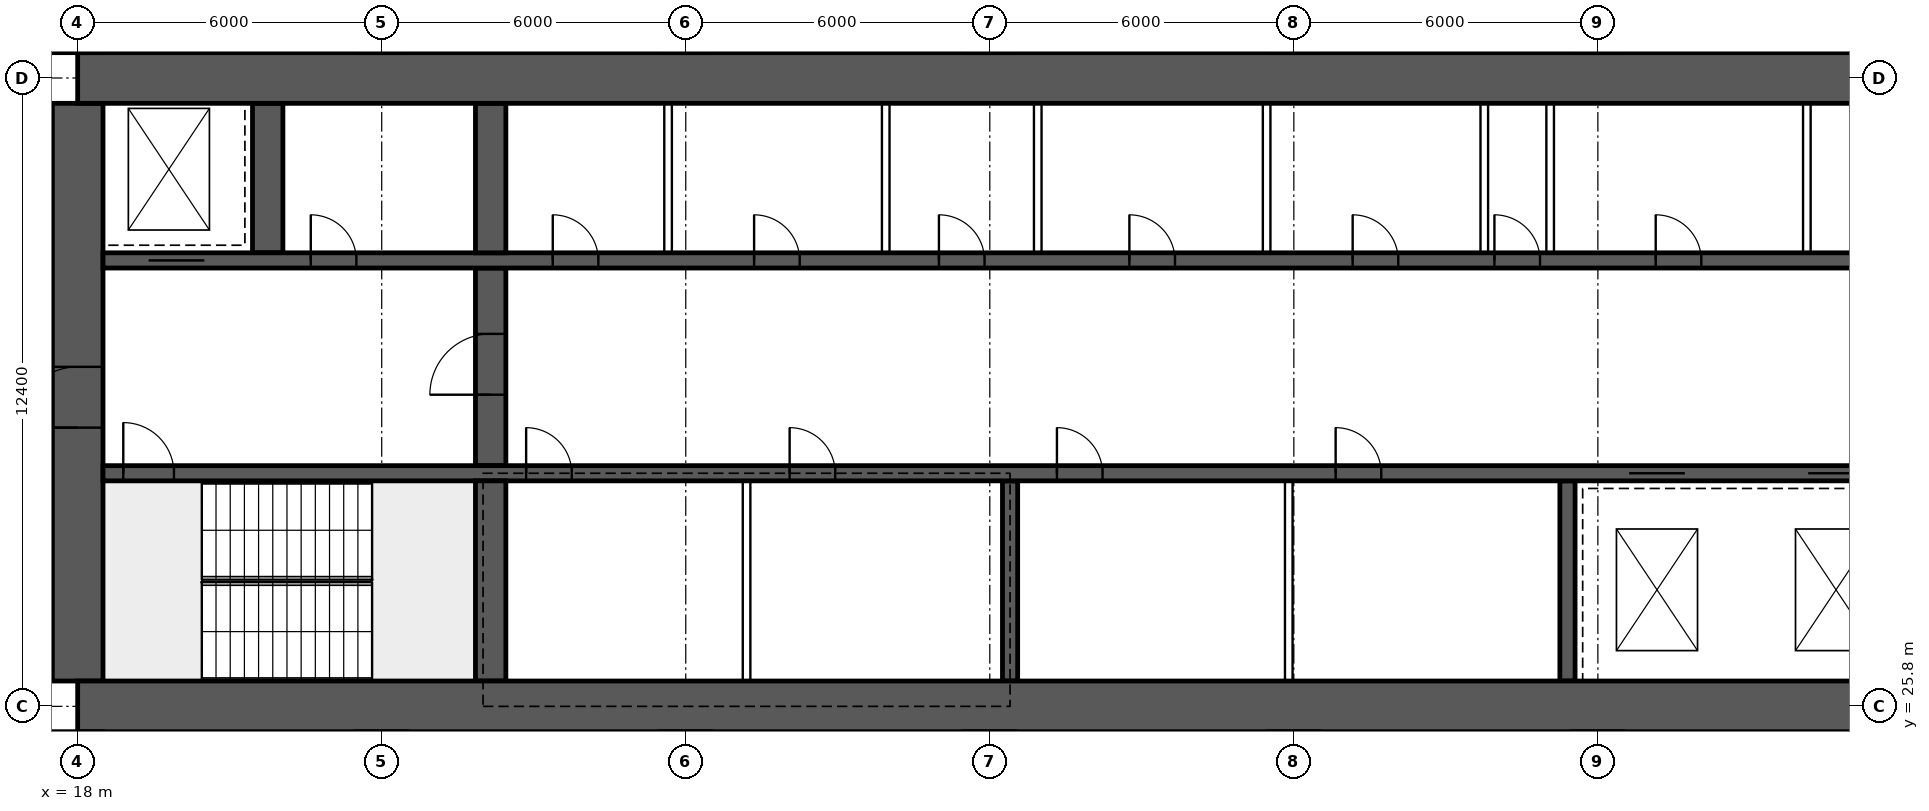
"""IFC4 building model, lengths in metres.
Left out: names, types, materials, properties, quantities, classifications, styles, units other than length and angle.
Written with IfcOpenShell. Run it as: python <this file> out.ifc"""

import sys

from ifc_helpers import new_model, si_unit, direction, frame, frame_2d, origin, place, context, subcontext, project, spatial, rectangle, extrude, element, fill, save


model = new_model("IFC4")
c1 = context("Model", 3, precision=1e-05, world=origin(), true_north=direction((0.0, 1.0)))
c2 = subcontext(c1, "Body", "Model", "MODEL_VIEW")
j1 = project(units=[si_unit("LENGTHUNIT", "METRE"), si_unit("PLANEANGLEUNIT", "RADIAN")], contexts=[c1])
p1 = place(None, origin())
s1 = spatial("IfcSite", under=j1, at=p1, CompositionType="ELEMENT")
p2 = place(p1, origin())
s2 = spatial("IfcBuilding", under=s1, at=p2, CompositionType="ELEMENT")
p3 = place(p2, frame((0.0, 0.0, -9.0)))
s3 = spatial("IfcBuildingStorey", under=s2, at=p3, CompositionType="ELEMENT", Elevation=-9.0)
for number, where, z_axis, x_axis in (
    (1, (18.0, 25.8, 0.0), (0.0, 0.0, 1.0), (1.0, 0.0, 0.0)),
    (2, (18.0, 38.2, 0.0), (0.0, 0.0, 1.0), (1.0, 0.0, 0.0)),
):
    element("IfcWall", number, at=place(p3, frame(where, z_axis=z_axis, x_axis=x_axis)), inside=s3, PredefinedType="SHEAR", context=c2, shape_type="SweptSolid", body=[
        extrude(rectangle(XDim=48.0, YDim=1.0, at=frame_2d((24.0, 0.0))), origin(), (0.0, 0.0, 1.0), 4.5),
    ])
p4 = place(p3, frame((18.0, 26.3, 0.0), z_axis=(0.0, 0.0, 1.0), x_axis=(0.0, 1.0, 0.0)))
e3 = element("IfcWall", 3, at=p4, inside=s3, PredefinedType="SHEAR", context=c2, shape_type="SweptSolid", body=[
    extrude(rectangle(XDim=11.4, YDim=1.0, at=frame_2d((5.7, 0.0))), origin(), (0.0, 0.0, 1.0), 4.5),
])
p5 = place(p4, frame((5.0, 0.0, 0.0)))
e4 = element("IfcOpeningElement", 4, at=p5, cuts=e3, PredefinedType="OPENING", context=c2, shape_type="SweptSolid", body=[
    extrude(rectangle(XDim=1.2, YDim=2.1, at=frame_2d((0.6, 1.05))), frame((0.0, 0.51, 0.0), z_axis=(0.0, -1.0, 0.0), x_axis=(1.0, 0.0, 0.0)), (0.0, 0.0, 1.0), 1.02),
])
p6 = place(p3, frame((18.5, 30.4, 0.0), z_axis=(0.0, 0.0, 1.0), x_axis=(1.0, 0.0, 0.0)))
e5 = element("IfcWall", 5, at=p6, inside=s3, PredefinedType="SHEAR", context=c2, shape_type="SweptSolid", body=[
    extrude(rectangle(XDim=47.0, YDim=0.3, at=frame_2d((23.5, 0.0))), origin(), (0.0, 0.0, 1.0), 4.5),
])
p7 = place(p6, frame((0.4, 0.0, 0.0)))
e6 = element("IfcOpeningElement", 6, at=p7, cuts=e5, PredefinedType="OPENING", context=c2, shape_type="SweptSolid", body=[
    extrude(rectangle(XDim=1.0, YDim=2.1, at=frame_2d((0.5, 1.05))), frame((0.0, 0.16, 0.0), z_axis=(0.0, -1.0, 0.0), x_axis=(1.0, 0.0, 0.0)), (0.0, 0.0, 1.0), 0.32),
])
p8 = place(p6, frame((45.6, 0.0, 0.0)))
e7 = element("IfcOpeningElement", 7, at=p8, cuts=e5, PredefinedType="OPENING", context=c2, shape_type="SweptSolid", body=[
    extrude(rectangle(XDim=1.0, YDim=2.1, at=frame_2d((0.5, 1.05))), frame((0.0, 0.16, 0.0), z_axis=(0.0, -1.0, 0.0), x_axis=(1.0, 0.0, 0.0)), (0.0, 0.0, 1.0), 0.32),
])
p9 = place(p6, frame((8.35, 0.0, 0.0)))
e8 = element("IfcOpeningElement", 8, at=p9, cuts=e5, PredefinedType="OPENING", context=c2, shape_type="SweptSolid", body=[
    extrude(rectangle(XDim=0.9, YDim=2.1, at=frame_2d((0.45, 1.05))), frame((0.0, 0.16, 0.0), z_axis=(0.0, -1.0, 0.0), x_axis=(1.0, 0.0, 0.0)), (0.0, 0.0, 1.0), 0.32),
])
p10 = place(p6, frame((13.55, 0.0, 0.0)))
e9 = element("IfcOpeningElement", 9, at=p10, cuts=e5, PredefinedType="OPENING", context=c2, shape_type="SweptSolid", body=[
    extrude(rectangle(XDim=0.9, YDim=2.1, at=frame_2d((0.45, 1.05))), frame((0.0, 0.16, 0.0), z_axis=(0.0, -1.0, 0.0), x_axis=(1.0, 0.0, 0.0)), (0.0, 0.0, 1.0), 0.32),
])
p11 = place(p6, frame((18.825, 0.0, 0.0)))
e10 = element("IfcOpeningElement", 10, at=p11, cuts=e5, PredefinedType="OPENING", context=c2, shape_type="SweptSolid", body=[
    extrude(rectangle(XDim=0.9, YDim=2.1, at=frame_2d((0.45, 1.05))), frame((0.0, 0.16, 0.0), z_axis=(0.0, -1.0, 0.0), x_axis=(1.0, 0.0, 0.0)), (0.0, 0.0, 1.0), 0.32),
])
p12 = place(p6, frame((24.325, 0.0, 0.0)))
e11 = element("IfcOpeningElement", 11, at=p12, cuts=e5, PredefinedType="OPENING", context=c2, shape_type="SweptSolid", body=[
    extrude(rectangle(XDim=0.9, YDim=2.1, at=frame_2d((0.45, 1.05))), frame((0.0, 0.16, 0.0), z_axis=(0.0, -1.0, 0.0), x_axis=(1.0, 0.0, 0.0)), (0.0, 0.0, 1.0), 0.32),
])
p13 = place(p6, frame((30.117, 0.0, 0.0)))
e12 = element("IfcOpeningElement", 12, at=p13, cuts=e5, PredefinedType="OPENING", context=c2, shape_type="SweptSolid", body=[
    extrude(rectangle(XDim=1.1, YDim=2.1, at=frame_2d((0.55, 1.05))), frame((0.0, 0.16, 0.0), z_axis=(0.0, -1.0, 0.0), x_axis=(1.0, 0.0, 0.0)), (0.0, 0.0, 1.0), 0.32),
])
p14 = place(p6, frame((33.65, 0.0, 0.0)))
e13 = element("IfcOpeningElement", 13, at=p14, cuts=e5, PredefinedType="OPENING", context=c2, shape_type="SweptSolid", body=[
    extrude(rectangle(XDim=1.1, YDim=2.1, at=frame_2d((0.55, 1.05))), frame((0.0, 0.16, 0.0), z_axis=(0.0, -1.0, 0.0), x_axis=(1.0, 0.0, 0.0)), (0.0, 0.0, 1.0), 0.32),
])
p15 = place(p6, frame((37.183, 0.0, 0.0)))
e14 = element("IfcOpeningElement", 14, at=p15, cuts=e5, PredefinedType="OPENING", context=c2, shape_type="SweptSolid", body=[
    extrude(rectangle(XDim=1.1, YDim=2.1, at=frame_2d((0.55, 1.05))), frame((0.0, 0.16, 0.0), z_axis=(0.0, -1.0, 0.0), x_axis=(1.0, 0.0, 0.0)), (0.0, 0.0, 1.0), 0.32),
])
p16 = place(p3, frame((18.5, 34.6, 0.0), z_axis=(0.0, 0.0, 1.0), x_axis=(1.0, 0.0, 0.0)))
e15 = element("IfcWall", 15, at=p16, inside=s3, PredefinedType="SHEAR", context=c2, shape_type="SweptSolid", body=[
    extrude(rectangle(XDim=47.0, YDim=0.3, at=frame_2d((23.5, 0.0))), origin(), (0.0, 0.0, 1.0), 4.5),
])
p17 = place(p16, frame((0.9, 0.0, 0.0)))
e16 = element("IfcOpeningElement", 16, at=p17, cuts=e15, PredefinedType="OPENING", context=c2, shape_type="SweptSolid", body=[
    extrude(rectangle(XDim=1.1, YDim=2.1, at=frame_2d((0.55, 1.05))), frame((0.0, 0.16, 0.0), z_axis=(0.0, -1.0, 0.0), x_axis=(1.0, 0.0, 0.0)), (0.0, 0.0, 1.0), 0.32),
])
p18 = place(p16, frame((45.0, 0.0, 0.0)))
e17 = element("IfcOpeningElement", 17, at=p18, cuts=e15, PredefinedType="OPENING", context=c2, shape_type="SweptSolid", body=[
    extrude(rectangle(XDim=1.1, YDim=2.1, at=frame_2d((0.55, 1.05))), frame((0.0, 0.16, 0.0), z_axis=(0.0, -1.0, 0.0), x_axis=(1.0, 0.0, 0.0)), (0.0, 0.0, 1.0), 0.32),
])
p19 = place(p16, frame((4.1, 0.0, 0.0)))
e18 = element("IfcOpeningElement", 18, at=p19, cuts=e15, PredefinedType="OPENING", context=c2, shape_type="SweptSolid", body=[
    extrude(rectangle(XDim=0.9, YDim=2.1, at=frame_2d((0.45, 1.05))), frame((0.0, 0.16, 0.0), z_axis=(0.0, -1.0, 0.0), x_axis=(1.0, 0.0, 0.0)), (0.0, 0.0, 1.0), 0.32),
])
p20 = place(p16, frame((42.0, 0.0, 0.0)))
e19 = element("IfcOpeningElement", 19, at=p20, cuts=e15, PredefinedType="OPENING", context=c2, shape_type="SweptSolid", body=[
    extrude(rectangle(XDim=0.9, YDim=2.1, at=frame_2d((0.45, 1.05))), frame((0.0, 0.16, 0.0), z_axis=(0.0, -1.0, 0.0), x_axis=(1.0, 0.0, 0.0)), (0.0, 0.0, 1.0), 0.32),
])
p21 = place(p16, frame((8.875, 0.0, 0.0)))
e20 = element("IfcOpeningElement", 20, at=p21, cuts=e15, PredefinedType="OPENING", context=c2, shape_type="SweptSolid", body=[
    extrude(rectangle(XDim=0.9, YDim=2.1, at=frame_2d((0.45, 1.05))), frame((0.0, 0.16, 0.0), z_axis=(0.0, -1.0, 0.0), x_axis=(1.0, 0.0, 0.0)), (0.0, 0.0, 1.0), 0.32),
])
p22 = place(p16, frame((12.849, 0.0, 0.0)))
e21 = element("IfcOpeningElement", 21, at=p22, cuts=e15, PredefinedType="OPENING", context=c2, shape_type="SweptSolid", body=[
    extrude(rectangle(XDim=0.9, YDim=2.1, at=frame_2d((0.45, 1.05))), frame((0.0, 0.16, 0.0), z_axis=(0.0, -1.0, 0.0), x_axis=(1.0, 0.0, 0.0)), (0.0, 0.0, 1.0), 0.32),
])
p23 = place(p16, frame((16.496, 0.0, 0.0)))
e22 = element("IfcOpeningElement", 22, at=p23, cuts=e15, PredefinedType="OPENING", context=c2, shape_type="SweptSolid", body=[
    extrude(rectangle(XDim=0.9, YDim=2.1, at=frame_2d((0.45, 1.05))), frame((0.0, 0.16, 0.0), z_axis=(0.0, -1.0, 0.0), x_axis=(1.0, 0.0, 0.0)), (0.0, 0.0, 1.0), 0.32),
])
p24 = place(p16, frame((20.255, 0.0, 0.0)))
e23 = element("IfcOpeningElement", 23, at=p24, cuts=e15, PredefinedType="OPENING", context=c2, shape_type="SweptSolid", body=[
    extrude(rectangle(XDim=0.9, YDim=2.1, at=frame_2d((0.45, 1.05))), frame((0.0, 0.16, 0.0), z_axis=(0.0, -1.0, 0.0), x_axis=(1.0, 0.0, 0.0)), (0.0, 0.0, 1.0), 0.32),
])
p25 = place(p16, frame((24.661, 0.0, 0.0)))
e24 = element("IfcOpeningElement", 24, at=p25, cuts=e15, PredefinedType="OPENING", context=c2, shape_type="SweptSolid", body=[
    extrude(rectangle(XDim=0.9, YDim=2.1, at=frame_2d((0.45, 1.05))), frame((0.0, 0.16, 0.0), z_axis=(0.0, -1.0, 0.0), x_axis=(1.0, 0.0, 0.0)), (0.0, 0.0, 1.0), 0.32),
])
p26 = place(p16, frame((27.458, 0.0, 0.0)))
e25 = element("IfcOpeningElement", 25, at=p26, cuts=e15, PredefinedType="OPENING", context=c2, shape_type="SweptSolid", body=[
    extrude(rectangle(XDim=0.9, YDim=2.1, at=frame_2d((0.45, 1.05))), frame((0.0, 0.16, 0.0), z_axis=(0.0, -1.0, 0.0), x_axis=(1.0, 0.0, 0.0)), (0.0, 0.0, 1.0), 0.32),
])
p27 = place(p16, frame((30.641, 0.0, 0.0)))
e26 = element("IfcOpeningElement", 26, at=p27, cuts=e15, PredefinedType="OPENING", context=c2, shape_type="SweptSolid", body=[
    extrude(rectangle(XDim=0.9, YDim=2.1, at=frame_2d((0.45, 1.05))), frame((0.0, 0.16, 0.0), z_axis=(0.0, -1.0, 0.0), x_axis=(1.0, 0.0, 0.0)), (0.0, 0.0, 1.0), 0.32),
])
p28 = place(p16, frame((34.592, 0.0, 0.0)))
e27 = element("IfcOpeningElement", 27, at=p28, cuts=e15, PredefinedType="OPENING", context=c2, shape_type="SweptSolid", body=[
    extrude(rectangle(XDim=0.9, YDim=2.1, at=frame_2d((0.45, 1.05))), frame((0.0, 0.16, 0.0), z_axis=(0.0, -1.0, 0.0), x_axis=(1.0, 0.0, 0.0)), (0.0, 0.0, 1.0), 0.32),
])
p29 = place(p16, frame((37.53, 0.0, 0.0)))
e28 = element("IfcOpeningElement", 28, at=p29, cuts=e15, PredefinedType="OPENING", context=c2, shape_type="SweptSolid", body=[
    extrude(rectangle(XDim=0.9, YDim=2.1, at=frame_2d((0.45, 1.05))), frame((0.0, 0.16, 0.0), z_axis=(0.0, -1.0, 0.0), x_axis=(1.0, 0.0, 0.0)), (0.0, 0.0, 1.0), 0.32),
])
p30 = place(p3, frame((26.15, 26.3, 0.0), z_axis=(0.0, 0.0, 1.0), x_axis=(0.0, 1.0, 0.0)))
e29 = element("IfcWall", 29, at=p30, inside=s3, PredefinedType="SHEAR", context=c2, shape_type="SweptSolid", body=[
    extrude(rectangle(XDim=3.95, YDim=0.6, at=frame_2d((1.975, 0.0))), origin(), (0.0, 0.0, 1.0), 4.5),
])
p31 = place(p3, frame((26.15, 30.55, 0.0), z_axis=(0.0, 0.0, 1.0), x_axis=(0.0, 1.0, 0.0)))
e30 = element("IfcWall", 30, at=p31, inside=s3, PredefinedType="SHEAR", context=c2, shape_type="SweptSolid", body=[
    extrude(rectangle(XDim=3.9, YDim=0.6, at=frame_2d((1.95, 0.0))), origin(), (0.0, 0.0, 1.0), 4.5),
])
p32 = place(p31, frame((1.4, 0.0, 0.0)))
e31 = element("IfcOpeningElement", 31, at=p32, cuts=e30, PredefinedType="OPENING", context=c2, shape_type="SweptSolid", body=[
    extrude(rectangle(XDim=1.2, YDim=2.1, at=frame_2d((0.6, 1.05))), frame((0.0, 0.31, 0.0), z_axis=(0.0, -1.0, 0.0), x_axis=(1.0, 0.0, 0.0)), (0.0, 0.0, 1.0), 0.62),
])
for number, where, z_axis, x_axis in (
    (32, (21.75, 34.75, 0.0), (0.0, 0.0, 1.0), (0.0, 1.0, 0.0)),
    (33, (26.15, 34.75, 0.0), (0.0, 0.0, 1.0), (0.0, 1.0, 0.0)),
):
    element("IfcWall", number, at=place(p3, frame(where, z_axis=z_axis, x_axis=x_axis)), inside=s3, PredefinedType="SHEAR", context=c2, shape_type="SweptSolid", body=[
        extrude(rectangle(XDim=2.95, YDim=0.6, at=frame_2d((1.475, 0.0))), origin(), (0.0, 0.0, 1.0), 4.5),
    ])
for number, where, z_axis, x_axis in (
    (34, (36.4, 26.3, 0.0), (0.0, 0.0, 1.0), (0.0, 1.0, 0.0)),
    (35, (47.4, 26.3, 0.0), (0.0, 0.0, 1.0), (0.0, 1.0, 0.0)),
):
    element("IfcWall", number, at=place(p3, frame(where, z_axis=z_axis, x_axis=x_axis)), inside=s3, PredefinedType="SHEAR", context=c2, shape_type="SweptSolid", body=[
        extrude(rectangle(XDim=3.95, YDim=0.3, at=frame_2d((1.975, 0.0))), origin(), (0.0, 0.0, 1.0), 4.5),
    ])
for number, where, z_axis, x_axis in (
    (36, (29.651, 34.75, 0.0), (0.0, 0.0, 1.0), (0.0, 1.0, 0.0)),
    (37, (33.946, 34.75, 0.0), (0.0, 0.0, 1.0), (0.0, 1.0, 0.0)),
    (38, (36.946, 34.75, 0.0), (0.0, 0.0, 1.0), (0.0, 1.0, 0.0)),
    (39, (41.463, 34.75, 0.0), (0.0, 0.0, 1.0), (0.0, 1.0, 0.0)),
    (40, (45.758, 34.75, 0.0), (0.0, 0.0, 1.0), (0.0, 1.0, 0.0)),
    (41, (47.058, 34.75, 0.0), (0.0, 0.0, 1.0), (0.0, 1.0, 0.0)),
    (42, (52.124, 34.75, 0.0), (0.0, 0.0, 1.0), (0.0, 1.0, 0.0)),
):
    element("IfcWall", number, at=place(p3, frame(where, z_axis=z_axis, x_axis=x_axis)), inside=s3, PredefinedType="SOLIDWALL", context=c2, shape_type="SweptSolid", body=[
        extrude(rectangle(XDim=2.95, YDim=0.15, at=frame_2d((1.475, 0.0))), origin(), (0.0, 0.0, 1.0), 4.2),
    ])
for number, where, z_axis, x_axis in (
    (43, (31.2, 26.3, 0.0), (0.0, 0.0, 1.0), (0.0, 1.0, 0.0)),
    (44, (41.9, 26.3, 0.0), (0.0, 0.0, 1.0), (0.0, 1.0, 0.0)),
):
    element("IfcWall", number, at=place(p3, frame(where, z_axis=z_axis, x_axis=x_axis)), inside=s3, PredefinedType="SOLIDWALL", context=c2, shape_type="SweptSolid", body=[
        extrude(rectangle(XDim=3.95, YDim=0.15, at=frame_2d((1.975, 0.0))), origin(), (0.0, 0.0, 1.0), 4.2),
    ])
p33 = place(p5, origin())
e45 = element("IfcDoor", 45, at=p33, inside=s3, OperationType="SINGLE_SWING_LEFT", PredefinedType="DOOR", context=c2, shape_type="SweptSolid", body=[
    extrude(rectangle(XDim=1.2, YDim=2.1, at=frame_2d((0.6, 1.05))), frame((0.0, 0.025, 0.0), z_axis=(0.0, -1.0, 0.0), x_axis=(1.0, 0.0, 0.0)), (0.0, 0.0, 1.0), 0.05),
])
fill(e4, e45)
p34 = place(p7, origin())
e46 = element("IfcDoor", 46, at=p34, inside=s3, OperationType="SINGLE_SWING_LEFT", PredefinedType="DOOR", context=c2, shape_type="SweptSolid", body=[
    extrude(rectangle(XDim=1.0, YDim=2.1, at=frame_2d((0.5, 1.05))), frame((0.0, 0.025, 0.0), z_axis=(0.0, -1.0, 0.0), x_axis=(1.0, 0.0, 0.0)), (0.0, 0.0, 1.0), 0.05),
])
fill(e6, e46)
p35 = place(p17, origin())
e47 = element("IfcDoor", 47, at=p35, inside=s3, OperationType="DOUBLE_DOOR_SLIDING", PredefinedType="DOOR", context=c2, shape_type="SweptSolid", body=[
    extrude(rectangle(XDim=1.1, YDim=2.1, at=frame_2d((0.55, 1.05))), frame((0.0, 0.025, 0.0), z_axis=(0.0, -1.0, 0.0), x_axis=(1.0, 0.0, 0.0)), (0.0, 0.0, 1.0), 0.05),
])
fill(e16, e47)
p36 = place(p19, origin())
e48 = element("IfcDoor", 48, at=p36, inside=s3, OperationType="SINGLE_SWING_LEFT", PredefinedType="DOOR", context=c2, shape_type="SweptSolid", body=[
    extrude(rectangle(XDim=0.9, YDim=2.1, at=frame_2d((0.45, 1.05))), frame((0.0, 0.025, 0.0), z_axis=(0.0, -1.0, 0.0), x_axis=(1.0, 0.0, 0.0)), (0.0, 0.0, 1.0), 0.05),
])
fill(e18, e48)
p37 = place(p32, origin())
e49 = element("IfcDoor", 49, at=p37, inside=s3, OperationType="SINGLE_SWING_LEFT", PredefinedType="DOOR", context=c2, shape_type="SweptSolid", body=[
    extrude(rectangle(XDim=1.2, YDim=2.1, at=frame_2d((0.6, 1.05))), frame((0.0, 0.025, 0.0), z_axis=(0.0, -1.0, 0.0), x_axis=(1.0, 0.0, 0.0)), (0.0, 0.0, 1.0), 0.05),
])
fill(e31, e49)
p38 = place(p21, origin())
e50 = element("IfcDoor", 50, at=p38, inside=s3, OperationType="SINGLE_SWING_LEFT", PredefinedType="DOOR", context=c2, shape_type="SweptSolid", body=[
    extrude(rectangle(XDim=0.9, YDim=2.1, at=frame_2d((0.45, 1.05))), frame((0.0, 0.025, 0.0), z_axis=(0.0, -1.0, 0.0), x_axis=(1.0, 0.0, 0.0)), (0.0, 0.0, 1.0), 0.05),
])
fill(e20, e50)
p39 = place(p22, origin())
e51 = element("IfcDoor", 51, at=p39, inside=s3, OperationType="SINGLE_SWING_LEFT", PredefinedType="DOOR", context=c2, shape_type="SweptSolid", body=[
    extrude(rectangle(XDim=0.9, YDim=2.1, at=frame_2d((0.45, 1.05))), frame((0.0, 0.025, 0.0), z_axis=(0.0, -1.0, 0.0), x_axis=(1.0, 0.0, 0.0)), (0.0, 0.0, 1.0), 0.05),
])
fill(e21, e51)
p40 = place(p23, origin())
e52 = element("IfcDoor", 52, at=p40, inside=s3, OperationType="SINGLE_SWING_LEFT", PredefinedType="DOOR", context=c2, shape_type="SweptSolid", body=[
    extrude(rectangle(XDim=0.9, YDim=2.1, at=frame_2d((0.45, 1.05))), frame((0.0, 0.025, 0.0), z_axis=(0.0, -1.0, 0.0), x_axis=(1.0, 0.0, 0.0)), (0.0, 0.0, 1.0), 0.05),
])
fill(e22, e52)
p41 = place(p24, origin())
e53 = element("IfcDoor", 53, at=p41, inside=s3, OperationType="SINGLE_SWING_LEFT", PredefinedType="DOOR", context=c2, shape_type="SweptSolid", body=[
    extrude(rectangle(XDim=0.9, YDim=2.1, at=frame_2d((0.45, 1.05))), frame((0.0, 0.025, 0.0), z_axis=(0.0, -1.0, 0.0), x_axis=(1.0, 0.0, 0.0)), (0.0, 0.0, 1.0), 0.05),
])
fill(e23, e53)
p42 = place(p25, origin())
e54 = element("IfcDoor", 54, at=p42, inside=s3, OperationType="SINGLE_SWING_LEFT", PredefinedType="DOOR", context=c2, shape_type="SweptSolid", body=[
    extrude(rectangle(XDim=0.9, YDim=2.1, at=frame_2d((0.45, 1.05))), frame((0.0, 0.025, 0.0), z_axis=(0.0, -1.0, 0.0), x_axis=(1.0, 0.0, 0.0)), (0.0, 0.0, 1.0), 0.05),
])
fill(e24, e54)
p43 = place(p26, origin())
e55 = element("IfcDoor", 55, at=p43, inside=s3, OperationType="SINGLE_SWING_LEFT", PredefinedType="DOOR", context=c2, shape_type="SweptSolid", body=[
    extrude(rectangle(XDim=0.9, YDim=2.1, at=frame_2d((0.45, 1.05))), frame((0.0, 0.025, 0.0), z_axis=(0.0, -1.0, 0.0), x_axis=(1.0, 0.0, 0.0)), (0.0, 0.0, 1.0), 0.05),
])
fill(e25, e55)
p44 = place(p27, origin())
e56 = element("IfcDoor", 56, at=p44, inside=s3, OperationType="SINGLE_SWING_LEFT", PredefinedType="DOOR", context=c2, shape_type="SweptSolid", body=[
    extrude(rectangle(XDim=0.9, YDim=2.1, at=frame_2d((0.45, 1.05))), frame((0.0, 0.025, 0.0), z_axis=(0.0, -1.0, 0.0), x_axis=(1.0, 0.0, 0.0)), (0.0, 0.0, 1.0), 0.05),
])
fill(e26, e56)
p45 = place(p9, origin())
e57 = element("IfcDoor", 57, at=p45, inside=s3, OperationType="SINGLE_SWING_LEFT", PredefinedType="DOOR", context=c2, shape_type="SweptSolid", body=[
    extrude(rectangle(XDim=0.9, YDim=2.1, at=frame_2d((0.45, 1.05))), frame((0.0, 0.025, 0.0), z_axis=(0.0, -1.0, 0.0), x_axis=(1.0, 0.0, 0.0)), (0.0, 0.0, 1.0), 0.05),
])
fill(e8, e57)
p46 = place(p10, origin())
e58 = element("IfcDoor", 58, at=p46, inside=s3, OperationType="SINGLE_SWING_LEFT", PredefinedType="DOOR", context=c2, shape_type="SweptSolid", body=[
    extrude(rectangle(XDim=0.9, YDim=2.1, at=frame_2d((0.45, 1.05))), frame((0.0, 0.025, 0.0), z_axis=(0.0, -1.0, 0.0), x_axis=(1.0, 0.0, 0.0)), (0.0, 0.0, 1.0), 0.05),
])
fill(e9, e58)
p47 = place(p11, origin())
e59 = element("IfcDoor", 59, at=p47, inside=s3, OperationType="SINGLE_SWING_LEFT", PredefinedType="DOOR", context=c2, shape_type="SweptSolid", body=[
    extrude(rectangle(XDim=0.9, YDim=2.1, at=frame_2d((0.45, 1.05))), frame((0.0, 0.025, 0.0), z_axis=(0.0, -1.0, 0.0), x_axis=(1.0, 0.0, 0.0)), (0.0, 0.0, 1.0), 0.05),
])
fill(e10, e59)
p48 = place(p12, origin())
e60 = element("IfcDoor", 60, at=p48, inside=s3, OperationType="SINGLE_SWING_LEFT", PredefinedType="DOOR", context=c2, shape_type="SweptSolid", body=[
    extrude(rectangle(XDim=0.9, YDim=2.1, at=frame_2d((0.45, 1.05))), frame((0.0, 0.025, 0.0), z_axis=(0.0, -1.0, 0.0), x_axis=(1.0, 0.0, 0.0)), (0.0, 0.0, 1.0), 0.05),
])
fill(e11, e60)
p49 = place(p13, origin())
e61 = element("IfcDoor", 61, at=p49, inside=s3, OperationType="DOUBLE_DOOR_SLIDING", PredefinedType="DOOR", context=c2, shape_type="SweptSolid", body=[
    extrude(rectangle(XDim=1.1, YDim=2.1, at=frame_2d((0.55, 1.05))), frame((0.0, 0.025, 0.0), z_axis=(0.0, -1.0, 0.0), x_axis=(1.0, 0.0, 0.0)), (0.0, 0.0, 1.0), 0.05),
])
fill(e12, e61)
p50 = place(p14, origin())
e62 = element("IfcDoor", 62, at=p50, inside=s3, OperationType="DOUBLE_DOOR_SLIDING", PredefinedType="DOOR", context=c2, shape_type="SweptSolid", body=[
    extrude(rectangle(XDim=1.1, YDim=2.1, at=frame_2d((0.55, 1.05))), frame((0.0, 0.025, 0.0), z_axis=(0.0, -1.0, 0.0), x_axis=(1.0, 0.0, 0.0)), (0.0, 0.0, 1.0), 0.05),
])
fill(e13, e62)
save(model, sys.argv[1])
